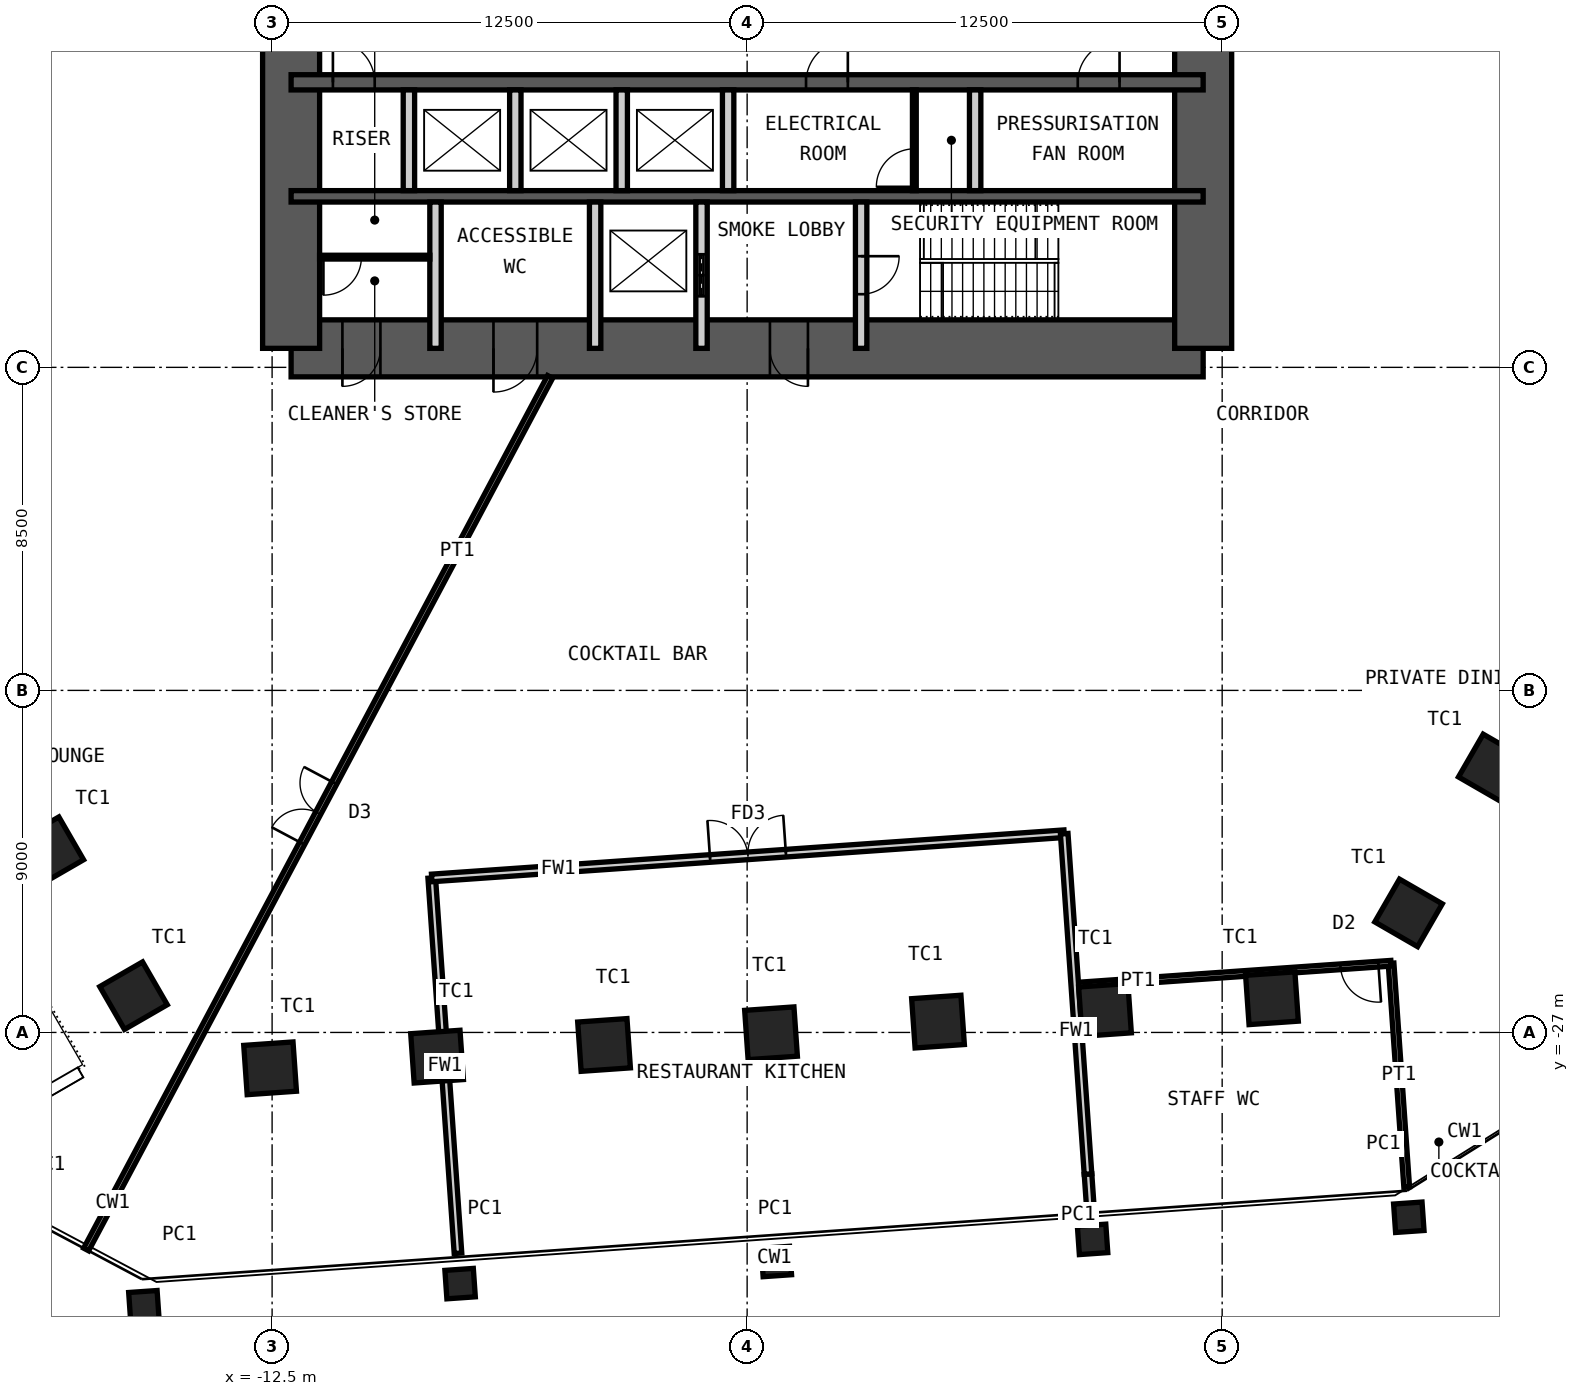
"""IFC4 building model, lengths in metres.
Left out: names, types, materials, properties, quantities, classifications, styles, units other than length and angle.
Written with IfcOpenShell. Run it as: python <this file> out.ifc"""

import sys

from ifc_helpers import new_model, si_unit, direction, frame, frame_2d, origin, origin_2d, place, context, subcontext, project, spatial, rectangle, hollow_rectangle, extrude, element, fill, save


model = new_model("IFC4")
c1 = context("Model", 3, precision=1e-05, world=origin(), true_north=direction((0.0, 1.0)))
c2 = subcontext(c1, "Body", "Model", "MODEL_VIEW")
j1 = project(units=[si_unit("LENGTHUNIT", "METRE"), si_unit("PLANEANGLEUNIT", "RADIAN")], contexts=[c1])
p1 = place(None, origin())
s1 = spatial("IfcSite", under=j1, at=p1, CompositionType="ELEMENT")
p2 = place(p1, origin())
s2 = spatial("IfcBuilding", under=s1, at=p2, CompositionType="ELEMENT")
p3 = place(p2, frame((0.0, 0.0, 12.0)))
s3 = spatial("IfcBuildingStorey", under=s2, at=p3, CompositionType="ELEMENT", Elevation=12.0)
for number, where, z_axis, x_axis in (
    (1, (19.607, -20.04, 0.0), (0.0, 0.0, 1.0), (0.5, 0.866, 0.0)),
    (2, (17.405, -23.854, 0.0), (0.0, 0.0, 1.0), (0.5, 0.866, 0.0)),
    (3, (13.811, -26.1, 0.0), (0.0, 0.0, 1.0), (0.998, 0.07, 0.0)),
    (4, (9.417, -26.407, 0.0), (0.0, 0.0, 1.0), (0.998, 0.07, 0.0)),
    (5, (5.023, -26.715, 0.0), (0.0, 0.0, 1.0), (0.998, 0.07, 0.0)),
    (6, (0.629, -27.022, 0.0), (0.0, 0.0, 1.0), (0.998, 0.07, 0.0)),
    (7, (-3.765, -27.329, 0.0), (0.0, 0.0, 1.0), (0.998, 0.07, 0.0)),
    (8, (-8.159, -27.636, 0.0), (0.0, 0.0, 1.0), (0.998, 0.07, 0.0)),
    (9, (-12.553, -27.944, 0.0), (0.0, 0.0, 1.0), (0.998, 0.07, 0.0)),
    (10, (-16.147, -26.033, 0.0), (0.0, 0.0, 1.0), (0.5, -0.866, 0.0)),
    (11, (-18.349, -22.218, 0.0), (0.0, 0.0, 1.0), (0.5, -0.866, 0.0)),
):
    element("IfcColumn", number, at=place(p3, frame(where, z_axis=z_axis, x_axis=x_axis)), inside=s3, PredefinedType="COLUMN", context=c2, shape_type="SweptSolid", body=[
        extrude(hollow_rectangle(XDim=1.3, YDim=1.3, WallThickness=0.1, at=origin_2d()), origin(), (0.0, 0.0, 1.0), 5.0),
    ])
for number, where, z_axis, x_axis in (
    (12, (17.411, -31.863, 0.0), (0.0, 0.0, 1.0), (0.998, 0.07, 0.0)),
    (13, (9.09, -32.445, 0.0), (0.0, 0.0, 1.0), (0.998, 0.07, 0.0)),
    (14, (0.769, -33.027, 0.0), (0.0, 0.0, 1.0), (0.998, 0.07, 0.0)),
    (15, (-7.553, -33.609, 0.0), (0.0, 0.0, 1.0), (0.998, 0.07, 0.0)),
    (16, (-15.874, -34.191, 0.0), (0.0, 0.0, 1.0), (0.998, 0.07, 0.0)),
):
    element("IfcColumn", number, at=place(p3, frame(where, z_axis=z_axis, x_axis=x_axis)), inside=s3, PredefinedType="COLUMN", context=c2, shape_type="SweptSolid", body=[
        extrude(hollow_rectangle(XDim=0.75, YDim=0.75, WallThickness=0.036, at=origin_2d()), origin(), (0.0, 0.0, 1.0), 5.0),
    ])
p4 = place(p3, frame((-12.0, -9.0, 0.0), z_axis=(0.0, 0.0, 1.0), x_axis=(1.0, 0.0, 0.0)))
e17 = element("IfcWall", 17, at=p4, inside=s3, PredefinedType="SHEAR", context=c2, shape_type="SweptSolid", body=[
    extrude(rectangle(XDim=24.0, YDim=1.5, at=frame_2d((12.0, 0.0))), origin(), (0.0, 0.0, 1.0), 5.0),
])
p5 = place(p4, frame((1.35, 0.0, 0.0)))
e18 = element("IfcOpeningElement", 18, at=p5, cuts=e17, PredefinedType="OPENING", context=c2, shape_type="SweptSolid", body=[
    extrude(rectangle(XDim=1.0, YDim=2.1, at=frame_2d((0.5, 1.05))), frame((0.0, 0.76, 0.0), z_axis=(0.0, -1.0, 0.0), x_axis=(1.0, 0.0, 0.0)), (0.0, 0.0, 1.0), 1.52),
])
p6 = place(p4, frame((5.325, 0.0, 0.0)))
e19 = element("IfcOpeningElement", 19, at=p6, cuts=e17, PredefinedType="OPENING", context=c2, shape_type="SweptSolid", body=[
    extrude(rectangle(XDim=1.15, YDim=2.1, at=frame_2d((0.575, 1.05))), frame((0.0, 0.76, 0.0), z_axis=(0.0, -1.0, 0.0), x_axis=(1.0, 0.0, 0.0)), (0.0, 0.0, 1.0), 1.52),
])
p7 = place(p4, frame((12.6, 0.0, 0.0)))
e20 = element("IfcOpeningElement", 20, at=p7, cuts=e17, PredefinedType="OPENING", context=c2, shape_type="SweptSolid", body=[
    extrude(rectangle(XDim=1.0, YDim=2.1, at=frame_2d((0.5, 1.05))), frame((0.0, 0.76, 0.0), z_axis=(0.0, -1.0, 0.0), x_axis=(1.0, 0.0, 0.0)), (0.0, 0.0, 1.0), 1.52),
])
p8 = place(p3, frame((12.0, -9.0, 0.0), z_axis=(0.0, 0.0, 1.0), x_axis=(0.0, 1.0, 0.0)))
e21 = element("IfcWall", 21, at=p8, inside=s3, PredefinedType="SHEAR", context=c2, shape_type="SweptSolid", body=[
    extrude(rectangle(XDim=18.0, YDim=1.5, at=frame_2d((9.0, 0.0))), origin(), (0.0, 0.0, 1.0), 5.0),
])
p9 = place(p8, frame((8.1, 0.0, 0.0)))
e22 = element("IfcOpeningElement", 22, at=p9, cuts=e21, PredefinedType="OPENING", context=c2, shape_type="SweptSolid", body=[
    extrude(rectangle(XDim=1.8, YDim=2.1, at=frame_2d((0.9, 1.05))), frame((0.0, 0.76, 0.0), z_axis=(0.0, -1.0, 0.0), x_axis=(1.0, 0.0, 0.0)), (0.0, 0.0, 1.0), 1.52),
])
p10 = place(p3, frame((-12.0, -9.0, 0.0), z_axis=(0.0, 0.0, 1.0), x_axis=(0.0, 1.0, 0.0)))
e23 = element("IfcWall", 23, at=p10, inside=s3, PredefinedType="SHEAR", context=c2, shape_type="SweptSolid", body=[
    extrude(rectangle(XDim=18.0, YDim=1.5, at=frame_2d((9.0, 0.0))), origin(), (0.0, 0.0, 1.0), 5.0),
])
p11 = place(p10, frame((8.1, 0.0, 0.0)))
e24 = element("IfcOpeningElement", 24, at=p11, cuts=e23, PredefinedType="OPENING", context=c2, shape_type="SweptSolid", body=[
    extrude(rectangle(XDim=1.8, YDim=2.1, at=frame_2d((0.9, 1.05))), frame((0.0, 0.76, 0.0), z_axis=(0.0, -1.0, 0.0), x_axis=(1.0, 0.0, 0.0)), (0.0, 0.0, 1.0), 1.52),
])
p12 = place(p3, frame((-12.0, -2.0, 0.0), z_axis=(0.0, 0.0, 1.0), x_axis=(1.0, 0.0, 0.0)))
e25 = element("IfcWall", 25, at=p12, inside=s3, PredefinedType="SHEAR", context=c2, shape_type="SweptSolid", body=[
    extrude(rectangle(XDim=24.0, YDim=0.4, at=frame_2d((12.0, 0.0))), origin(), (0.0, 0.0, 1.0), 5.0),
])
p13 = place(p12, frame((1.1, 0.0, 0.0)))
e26 = element("IfcOpeningElement", 26, at=p13, cuts=e25, PredefinedType="OPENING", context=c2, shape_type="SweptSolid", body=[
    extrude(rectangle(XDim=1.1, YDim=2.1, at=frame_2d((0.55, 1.05))), frame((0.0, 0.21, 0.0), z_axis=(0.0, -1.0, 0.0), x_axis=(1.0, 0.0, 0.0)), (0.0, 0.0, 1.0), 0.42),
])
p14 = place(p12, frame((13.55, 0.0, 0.0)))
e27 = element("IfcOpeningElement", 27, at=p14, cuts=e25, PredefinedType="OPENING", context=c2, shape_type="SweptSolid", body=[
    extrude(rectangle(XDim=1.1, YDim=2.1, at=frame_2d((0.55, 1.05))), frame((0.0, 0.21, 0.0), z_axis=(0.0, -1.0, 0.0), x_axis=(1.0, 0.0, 0.0)), (0.0, 0.0, 1.0), 0.42),
])
p15 = place(p12, frame((20.7, 0.0, 0.0)))
e28 = element("IfcOpeningElement", 28, at=p15, cuts=e25, PredefinedType="OPENING", context=c2, shape_type="SweptSolid", body=[
    extrude(rectangle(XDim=1.1, YDim=2.1, at=frame_2d((0.55, 1.05))), frame((0.0, 0.21, 0.0), z_axis=(0.0, -1.0, 0.0), x_axis=(1.0, 0.0, 0.0)), (0.0, 0.0, 1.0), 0.42),
])
p16 = place(p3, frame((-12.0, -5.0, 0.0), z_axis=(0.0, 0.0, 1.0), x_axis=(1.0, 0.0, 0.0)))
e29 = element("IfcWall", 29, at=p16, inside=s3, PredefinedType="SHEAR", context=c2, shape_type="SweptSolid", body=[
    extrude(rectangle(XDim=24.0, YDim=0.3, at=frame_2d((12.0, 0.0))), origin(), (0.0, 0.0, 1.0), 5.0),
])
for number, where, z_axis, x_axis in (
    (30, (-8.9, -4.85, 0.0), (0.0, 0.0, 1.0), (0.0, 1.0, 0.0)),
    (31, (-6.1, -4.85, 0.0), (0.0, 0.0, 1.0), (0.0, 1.0, 0.0)),
    (32, (-3.3, -4.85, 0.0), (0.0, 0.0, 1.0), (0.0, 1.0, 0.0)),
    (33, (-0.5, -4.85, 0.0), (0.0, 0.0, 1.0), (0.0, 1.0, 0.0)),
    (34, (6.0, -4.85, 0.0), (0.0, 0.0, 1.0), (0.0, 1.0, 0.0)),
):
    element("IfcWall", number, at=place(p3, frame(where, z_axis=z_axis, x_axis=x_axis)), inside=s3, PredefinedType="PARTITIONING", context=c2, shape_type="SweptSolid", body=[
        extrude(rectangle(XDim=2.65, YDim=0.3, at=frame_2d((1.325, 0.0))), origin(), (0.0, 0.0, 1.0), 4.78),
    ])
for number, where, z_axis, x_axis in (
    (35, (-8.2, -9.0, 0.0), (0.0, 0.0, 1.0), (0.0, 1.0, 0.0)),
    (36, (-4.0, -9.0, 0.0), (0.0, 0.0, 1.0), (0.0, 1.0, 0.0)),
):
    element("IfcWall", number, at=place(p3, frame(where, z_axis=z_axis, x_axis=x_axis)), inside=s3, PredefinedType="PARTITIONING", context=c2, shape_type="SweptSolid", body=[
        extrude(rectangle(XDim=3.85, YDim=0.3, at=frame_2d((1.925, 0.0))), origin(), (0.0, 0.0, 1.0), 4.78),
    ])
p17 = place(p3, frame((-1.2, -9.0, 0.0), z_axis=(0.0, 0.0, 1.0), x_axis=(0.0, 1.0, 0.0)))
e37 = element("IfcWall", 37, at=p17, inside=s3, PredefinedType="PARTITIONING", context=c2, shape_type="SweptSolid", body=[
    extrude(rectangle(XDim=3.85, YDim=0.3, at=frame_2d((1.925, 0.0))), origin(), (0.0, 0.0, 1.0), 4.78),
])
p18 = place(p17, frame((1.375, 0.0, 0.0)))
e38 = element("IfcOpeningElement", 38, at=p18, cuts=e37, PredefinedType="OPENING", context=c2, shape_type="SweptSolid", body=[
    extrude(rectangle(XDim=1.1, YDim=2.4, at=frame_2d((0.55, 1.2))), frame((0.0, 0.16, 0.0), z_axis=(0.0, -1.0, 0.0), x_axis=(1.0, 0.0, 0.0)), (0.0, 0.0, 1.0), 0.32),
])
p19 = place(p3, frame((3.0, -9.0, 0.0), z_axis=(0.0, 0.0, 1.0), x_axis=(0.0, 1.0, 0.0)))
e39 = element("IfcWall", 39, at=p19, inside=s3, PredefinedType="PARTITIONING", context=c2, shape_type="SweptSolid", body=[
    extrude(rectangle(XDim=3.85, YDim=0.3, at=frame_2d((1.925, 0.0))), origin(), (0.0, 0.0, 1.0), 4.78),
])
p20 = place(p19, frame((1.425, 0.0, 0.0)))
e40 = element("IfcOpeningElement", 40, at=p20, cuts=e39, PredefinedType="OPENING", context=c2, shape_type="SweptSolid", body=[
    extrude(rectangle(XDim=1.0, YDim=2.1, at=frame_2d((0.5, 1.05))), frame((0.0, 0.16, 0.0), z_axis=(0.0, -1.0, 0.0), x_axis=(1.0, 0.0, 0.0)), (0.0, 0.0, 1.0), 0.32),
])
p21 = place(p3, frame((4.4, -4.85, 0.0), z_axis=(0.0, 0.0, 1.0), x_axis=(0.0, 1.0, 0.0)))
e41 = element("IfcWall", 41, at=p21, inside=s3, PredefinedType="PARTITIONING", context=c2, shape_type="SweptSolid", body=[
    extrude(rectangle(XDim=2.65, YDim=0.1, at=frame_2d((1.325, 0.0))), origin(), (0.0, 0.0, 1.0), 4.78),
])
p22 = place(p21, frame((0.1, 0.0, 0.0)))
e42 = element("IfcOpeningElement", 42, at=p22, cuts=e41, PredefinedType="OPENING", context=c2, shape_type="SweptSolid", body=[
    extrude(rectangle(XDim=1.0, YDim=2.4, at=frame_2d((0.5, 1.2))), frame((0.0, 0.06, 0.0), z_axis=(0.0, -1.0, 0.0), x_axis=(1.0, 0.0, 0.0)), (0.0, 0.0, 1.0), 0.12),
])
p23 = place(p3, frame((-11.25, -6.6, 0.0), z_axis=(0.0, 0.0, 1.0), x_axis=(1.0, 0.0, 0.0)))
e43 = element("IfcWall", 43, at=p23, inside=s3, PredefinedType="PARTITIONING", context=c2, shape_type="SweptSolid", body=[
    extrude(rectangle(XDim=2.9, YDim=0.1, at=frame_2d((1.45, 0.0))), origin(), (0.0, 0.0, 1.0), 4.78),
])
p24 = place(p23, frame((0.1, 0.0, 0.0)))
e44 = element("IfcOpeningElement", 44, at=p24, cuts=e43, PredefinedType="OPENING", context=c2, shape_type="SweptSolid", body=[
    extrude(rectangle(XDim=1.0, YDim=2.4, at=frame_2d((0.5, 1.2))), frame((0.0, 0.06, 0.0), z_axis=(0.0, -1.0, 0.0), x_axis=(1.0, 0.0, 0.0)), (0.0, 0.0, 1.0), 0.12),
])
p25 = place(p3, frame((9.034, -31.647, 0.0), z_axis=(0.0, 0.0, 1.0), x_axis=(-0.069837025026, 0.997558414297, 0.0)))
e45 = element("IfcWall", 45, at=p25, inside=s3, PredefinedType="PARTITIONING", context=c2, shape_type="SweptSolid", body=[
    extrude(rectangle(XDim=0.923, YDim=0.2, at=frame_2d((0.461, 0.0))), origin(), (0.0, 0.0, 1.0), 3.6),
])
p26 = place(p3, frame((-7.609, -32.811, 0.0), z_axis=(0.0, 0.0, 1.0), x_axis=(-0.069764341483, 0.997563500063, 0.0)))
e46 = element("IfcWall", 46, at=p26, inside=s3, PredefinedType="PARTITIONING", context=c2, shape_type="SweptSolid", body=[
    extrude(rectangle(XDim=9.9, YDim=0.2, at=frame_2d((4.95, 0.0))), origin(), (0.0, 0.0, 1.0), 4.7),
])
p27 = place(p3, frame((8.344, -21.771, 0.0), z_axis=(0.0, 0.0, 1.0), x_axis=(-0.997563959397, -0.069757773133, 0.0)))
e47 = element("IfcWall", 47, at=p27, inside=s3, PredefinedType="PARTITIONING", context=c2, shape_type="SweptSolid", body=[
    extrude(rectangle(XDim=16.684, YDim=0.2, at=frame_2d((8.342, 0.0))), origin(), (0.0, 0.0, 1.0), 4.7),
])
p28 = place(p27, frame((7.342, 0.0, 0.0)))
e48 = element("IfcOpeningElement", 48, at=p28, cuts=e47, PredefinedType="OPENING", context=c2, shape_type="SweptSolid", body=[
    extrude(rectangle(XDim=2.0, YDim=2.4, at=frame_2d((1.0, 1.2))), frame((0.0, 0.11, 0.0), z_axis=(0.0, -1.0, 0.0), x_axis=(1.0, 0.0, 0.0)), (0.0, 0.0, 1.0), 0.22),
])
p29 = place(p3, frame((17.356, -31.065, 0.0), z_axis=(0.0, 0.0, 1.0), x_axis=(-0.069767771051, 0.997563260211, 0.0)))
e49 = element("IfcWall", 49, at=p29, inside=s3, PredefinedType="PARTITIONING", context=c2, shape_type="SweptSolid", body=[
    extrude(rectangle(XDim=5.9, YDim=0.15, at=frame_2d((2.95, 0.0))), origin(), (0.0, 0.0, 1.0), 4.7),
])
p30 = place(p3, frame((16.944, -25.179, 0.0), z_axis=(0.0, 0.0, 1.0), x_axis=(-0.997564977604, -0.069743210844, 0.0)))
e50 = element("IfcWall", 50, at=p30, inside=s3, PredefinedType="PARTITIONING", context=c2, shape_type="SweptSolid", body=[
    extrude(rectangle(XDim=8.342, YDim=0.15, at=frame_2d((4.171, 0.0))), origin(), (0.0, 0.0, 1.0), 4.7),
])
p31 = place(p30, frame((0.334, 0.0, 0.0)))
e51 = element("IfcOpeningElement", 51, at=p31, cuts=e50, PredefinedType="OPENING", context=c2, shape_type="SweptSolid", body=[
    extrude(rectangle(XDim=1.0, YDim=2.4, at=frame_2d((0.5, 1.2))), frame((0.0, 0.085, 0.0), z_axis=(0.0, -1.0, 0.0), x_axis=(1.0, 0.0, 0.0)), (0.0, 0.0, 1.0), 0.17),
])
p32 = place(p3, frame((-5.184, -9.75, 0.0), z_axis=(0.0, 0.0, 1.0), x_axis=(-0.469477354847, -0.882944513141, 0.0)))
e52 = element("IfcWall", 52, at=p32, inside=s3, PredefinedType="PARTITIONING", context=c2, shape_type="SweptSolid", body=[
    extrude(rectangle(XDim=26.005, YDim=0.15, at=frame_2d((13.002, 0.0))), origin(), (0.0, 0.0, 1.0), 4.7),
])
p33 = place(p32, frame((12.103, 0.0, 0.0)))
e53 = element("IfcOpeningElement", 53, at=p33, cuts=e52, PredefinedType="OPENING", context=c2, shape_type="SweptSolid", body=[
    extrude(rectangle(XDim=1.8, YDim=2.4, at=frame_2d((0.9, 1.2))), frame((0.0, 0.085, 0.0), z_axis=(0.0, -1.0, 0.0), x_axis=(1.0, 0.0, 0.0)), (0.0, 0.0, 1.0), 0.17),
])
p34 = place(p3, frame((8.97, -30.726, 0.0), z_axis=(0.0, 0.0, 1.0), x_axis=(-0.069729805766, 0.997565914708, 0.0)))
e54 = element("IfcWall", 54, at=p34, inside=s3, PredefinedType="PARTITIONING", context=c2, shape_type="SweptSolid", body=[
    extrude(rectangle(XDim=8.977, YDim=0.2, at=frame_2d((4.489, 0.0))), origin(), (0.0, 0.0, 1.0), 4.7),
])
p35 = place(p5, origin())
e55 = element("IfcDoor", 55, at=p35, inside=s3, OperationType="SINGLE_SWING_LEFT", PredefinedType="DOOR", context=c2, shape_type="SweptSolid", body=[
    extrude(rectangle(XDim=1.0, YDim=2.1, at=frame_2d((0.5, 1.05))), frame((0.0, 0.025, 0.0), z_axis=(0.0, -1.0, 0.0), x_axis=(1.0, 0.0, 0.0)), (0.0, 0.0, 1.0), 0.05),
])
fill(e18, e55)
p36 = place(p6, origin())
e56 = element("IfcDoor", 56, at=p36, inside=s3, OperationType="SINGLE_SWING_LEFT", PredefinedType="DOOR", context=c2, shape_type="SweptSolid", body=[
    extrude(rectangle(XDim=1.15, YDim=2.1, at=frame_2d((0.575, 1.05))), frame((0.0, 0.025, 0.0), z_axis=(0.0, -1.0, 0.0), x_axis=(1.0, 0.0, 0.0)), (0.0, 0.0, 1.0), 0.05),
])
fill(e19, e56)
p37 = place(p7, origin())
e57 = element("IfcDoor", 57, at=p37, inside=s3, OperationType="SINGLE_SWING_RIGHT", PredefinedType="DOOR", context=c2, shape_type="SweptSolid", body=[
    extrude(rectangle(XDim=1.0, YDim=2.1, at=frame_2d((0.5, 1.05))), frame((0.0, 0.025, 0.0), z_axis=(0.0, -1.0, 0.0), x_axis=(1.0, 0.0, 0.0)), (0.0, 0.0, 1.0), 0.05),
])
fill(e20, e57)
p38 = place(p20, origin())
e58 = element("IfcDoor", 58, at=p38, inside=s3, OperationType="SINGLE_SWING_RIGHT", PredefinedType="DOOR", context=c2, shape_type="SweptSolid", body=[
    extrude(rectangle(XDim=1.0, YDim=2.1, at=frame_2d((0.5, 1.05))), frame((0.0, 0.025, 0.0), z_axis=(0.0, -1.0, 0.0), x_axis=(1.0, 0.0, 0.0)), (0.0, 0.0, 1.0), 0.05),
])
fill(e40, e58)
p39 = place(p13, origin())
e59 = element("IfcDoor", 59, at=p39, inside=s3, OperationType="SINGLE_SWING_RIGHT", PredefinedType="DOOR", context=c2, shape_type="SweptSolid", body=[
    extrude(rectangle(XDim=1.1, YDim=2.1, at=frame_2d((0.55, 1.05))), frame((0.0, 0.025, 0.0), z_axis=(0.0, -1.0, 0.0), x_axis=(1.0, 0.0, 0.0)), (0.0, 0.0, 1.0), 0.05),
])
fill(e26, e59)
p40 = place(p14, origin())
e60 = element("IfcDoor", 60, at=p40, inside=s3, OperationType="SINGLE_SWING_LEFT", PredefinedType="DOOR", context=c2, shape_type="SweptSolid", body=[
    extrude(rectangle(XDim=1.1, YDim=2.1, at=frame_2d((0.55, 1.05))), frame((0.0, 0.025, 0.0), z_axis=(0.0, -1.0, 0.0), x_axis=(1.0, 0.0, 0.0)), (0.0, 0.0, 1.0), 0.05),
])
fill(e27, e60)
p41 = place(p15, origin())
e61 = element("IfcDoor", 61, at=p41, inside=s3, OperationType="SINGLE_SWING_LEFT", PredefinedType="DOOR", context=c2, shape_type="SweptSolid", body=[
    extrude(rectangle(XDim=1.1, YDim=2.1, at=frame_2d((0.55, 1.05))), frame((0.0, 0.025, 0.0), z_axis=(0.0, -1.0, 0.0), x_axis=(1.0, 0.0, 0.0)), (0.0, 0.0, 1.0), 0.05),
])
fill(e28, e61)
p42 = place(p18, origin())
e62 = element("IfcDoor", 62, at=p42, inside=s3, OperationType="DOUBLE_DOOR_SLIDING", PredefinedType="DOOR", context=c2, shape_type="SweptSolid", body=[
    extrude(rectangle(XDim=1.1, YDim=2.4, at=frame_2d((0.55, 1.2))), frame((0.0, 0.025, 0.0), z_axis=(0.0, -1.0, 0.0), x_axis=(1.0, 0.0, 0.0)), (0.0, 0.0, 1.0), 0.05),
])
fill(e38, e62)
p43 = place(p22, origin())
e63 = element("IfcDoor", 63, at=p43, inside=s3, OperationType="SINGLE_SWING_RIGHT", PredefinedType="DOOR", context=c2, shape_type="SweptSolid", body=[
    extrude(rectangle(XDim=1.0, YDim=2.4, at=frame_2d((0.5, 1.2))), frame((0.0, 0.025, 0.0), z_axis=(0.0, -1.0, 0.0), x_axis=(1.0, 0.0, 0.0)), (0.0, 0.0, 1.0), 0.05),
])
fill(e42, e63)
p44 = place(p24, origin())
e64 = element("IfcDoor", 64, at=p44, inside=s3, OperationType="SINGLE_SWING_LEFT", PredefinedType="DOOR", context=c2, shape_type="SweptSolid", body=[
    extrude(rectangle(XDim=1.0, YDim=2.4, at=frame_2d((0.5, 1.2))), frame((0.0, 0.025, 0.0), z_axis=(0.0, -1.0, 0.0), x_axis=(1.0, 0.0, 0.0)), (0.0, 0.0, 1.0), 0.05),
])
fill(e44, e64)
p45 = place(p28, origin())
e65 = element("IfcDoor", 65, at=p45, inside=s3, OperationType="DOUBLE_DOOR_DOUBLE_SWING", PredefinedType="DOOR", context=c2, shape_type="SweptSolid", body=[
    extrude(rectangle(XDim=2.0, YDim=2.4, at=frame_2d((1.0, 1.2))), frame((0.0, 0.025, 0.0), z_axis=(0.0, -1.0, 0.0), x_axis=(1.0, 0.0, 0.0)), (0.0, 0.0, 1.0), 0.05),
])
fill(e48, e65)
p46 = place(p31, origin())
e66 = element("IfcDoor", 66, at=p46, inside=s3, OperationType="SINGLE_SWING_RIGHT", PredefinedType="DOOR", context=c2, shape_type="SweptSolid", body=[
    extrude(rectangle(XDim=1.0, YDim=2.4, at=frame_2d((0.5, 1.2))), frame((0.0, 0.025, 0.0), z_axis=(0.0, -1.0, 0.0), x_axis=(1.0, 0.0, 0.0)), (0.0, 0.0, 1.0), 0.05),
])
fill(e51, e66)
p47 = place(p33, origin())
e67 = element("IfcDoor", 67, at=p47, inside=s3, OperationType="DOUBLE_DOOR_DOUBLE_SWING", PredefinedType="DOOR", context=c2, shape_type="SweptSolid", body=[
    extrude(rectangle(XDim=1.8, YDim=2.4, at=frame_2d((0.9, 1.2))), frame((0.0, 0.025, 0.0), z_axis=(0.0, -1.0, 0.0), x_axis=(1.0, 0.0, 0.0)), (0.0, 0.0, 1.0), 0.05),
])
fill(e53, e67)
save(model, sys.argv[1])
